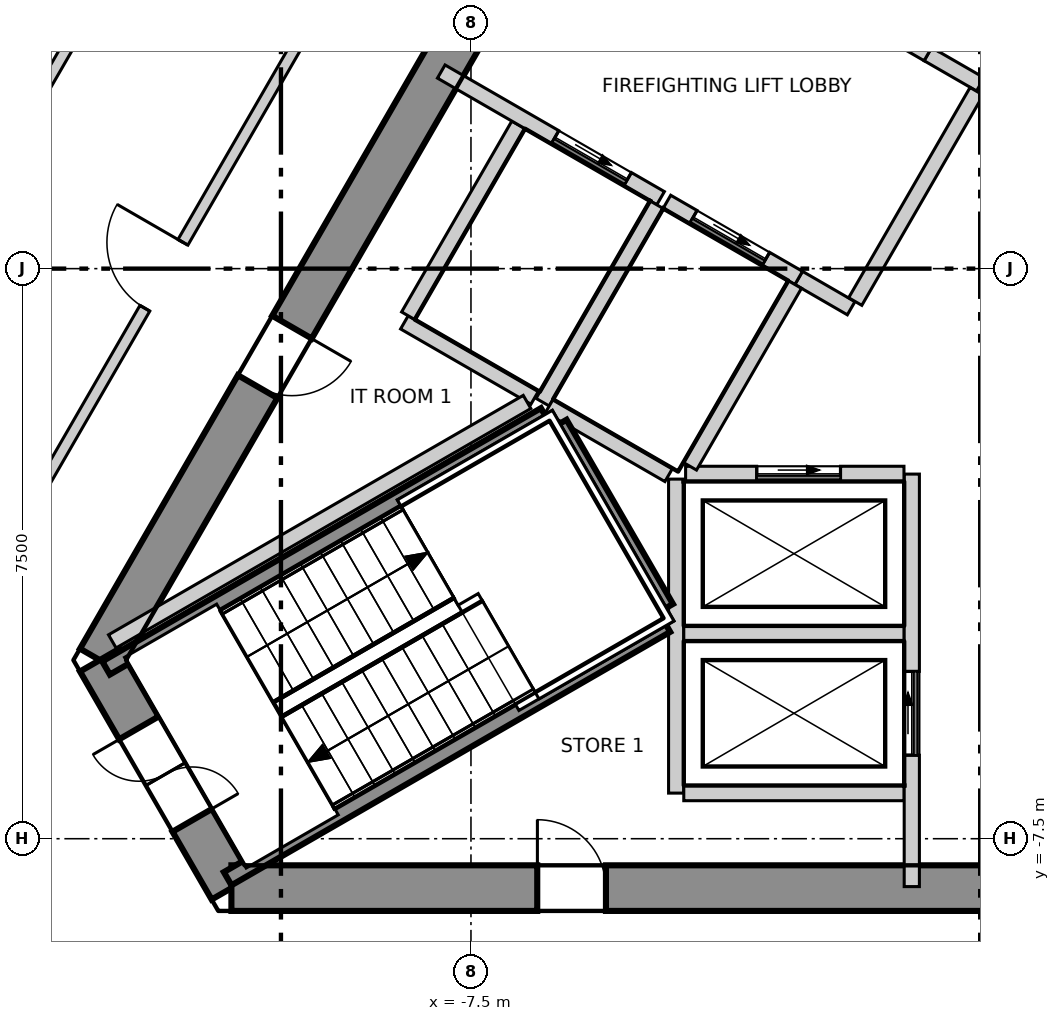
"""IFC4 building model, lengths in metres.
Left out: names, types, materials, properties, quantities, classifications, styles, units other than length and angle.
Written with IfcOpenShell. Run it as: python <this file> out.ifc"""

import sys

from ifc_helpers import new_model, si_unit, direction, frame, frame_2d, origin, place, context, subcontext, project, spatial, polyline, rectangle, outline, extrude, element, fill, save


model = new_model("IFC4")
c1 = context("Model", 3, precision=1e-05, world=origin(), true_north=direction((0.0, 1.0)))
c2 = subcontext(c1, "Body", "Model", "MODEL_VIEW")
j1 = project(units=[si_unit("LENGTHUNIT", "METRE"), si_unit("PLANEANGLEUNIT", "RADIAN")], contexts=[c1])
p1 = place(None, origin())
s1 = spatial("IfcSite", under=j1, at=p1, CompositionType="ELEMENT")
p2 = place(p1, origin())
s2 = spatial("IfcBuilding", under=s1, at=p2, CompositionType="ELEMENT")
p3 = place(p2, frame((0.0, 0.0, 261.8)))
s3 = spatial("IfcBuildingStorey", under=s2, at=p3, CompositionType="ELEMENT", Elevation=261.8)
p4 = place(p3, frame((-1.732, 13.3, -0.3), z_axis=(0.0, 0.0, 1.0), x_axis=(-0.500000539815, -0.866025092122, 0.0)))
e1 = element("IfcWall", 1, at=p4, inside=s3, PredefinedType="SHEAR", context=c2, shape_type="SweptSolid", body=[
    extrude(outline(polyline([(-0.173, -0.3), (1.795, -0.3), (3.763, -0.3), (5.732, -0.3), (7.7, -0.3), (9.668, -0.301), (11.637, -0.301), (13.605, -0.301), (15.573, -0.301), (17.542, -0.301), (19.51, -0.301), (21.478, -0.301), (21.131, 0.3), (19.226, 0.3), (17.321, 0.3), (15.415, 0.3), (13.51, 0.3), (11.605, 0.3), (9.699, 0.3), (7.794, 0.3), (5.889, 0.3), (3.984, 0.3), (2.078, 0.3), (0.173, 0.3), (-0.173, -0.3)])), origin(), (0.0, 0.0, 1.0), 6.5),
])
p5 = place(p4, frame((10.102, 0.0, 0.3)))
e2 = element("IfcOpeningElement", 2, at=p5, cuts=e1, PredefinedType="OPENING", context=c2, shape_type="SweptSolid", body=[
    extrude(rectangle(XDim=1.1, YDim=2.1, at=frame_2d((0.55, 1.05))), frame((0.0, 0.31, 0.0), z_axis=(0.0, -1.0, 0.0), x_axis=(1.0, 0.0, 0.0)), (0.0, 0.0, 1.0), 0.621),
])
p6 = place(p4, frame((16.248, 0.0, 0.3)))
e3 = element("IfcOpeningElement", 3, at=p6, cuts=e1, PredefinedType="OPENING", context=c2, shape_type="SweptSolid", body=[
    extrude(rectangle(XDim=0.9, YDim=2.1, at=frame_2d((0.45, 1.05))), frame((0.0, 0.31, 0.0), z_axis=(0.0, -1.0, 0.0), x_axis=(1.0, 0.0, 0.0)), (0.0, 0.0, 1.0), 0.621),
])
p7 = place(p3, frame((-12.384, -5.15, -0.3), z_axis=(0.0, 0.0, 1.0), x_axis=(0.49997462182, -0.866040055388, 0.0)))
e4 = element("IfcWall", 4, at=p7, inside=s3, PredefinedType="SHEAR", context=c2, shape_type="SweptSolid", body=[
    extrude(outline(polyline([(-0.173, -0.301), (1.732, -0.301), (3.637, -0.3), (3.291, 0.3), (1.732, 0.3), (0.173, 0.3), (-0.173, -0.301)])), origin(), (0.0, 0.0, 1.0), 6.5),
])
p8 = place(p7, frame((1.032, 0.0, 0.3)))
e5 = element("IfcOpeningElement", 5, at=p8, cuts=e4, PredefinedType="OPENING", context=c2, shape_type="SweptSolid", body=[
    extrude(rectangle(XDim=1.4, YDim=2.1, at=frame_2d((0.7, 1.05))), frame((0.0, 0.31, 0.0), z_axis=(0.0, -1.0, 0.0), x_axis=(1.0, 0.0, 0.0)), (0.0, 0.0, 1.0), 0.621),
])
p9 = place(p3, frame((-10.652, -8.15, -0.3), z_axis=(0.0, 0.0, 1.0), x_axis=(1.0, 0.0, 0.0)))
e6 = element("IfcWall", 6, at=p9, inside=s3, PredefinedType="SHEAR", context=c2, shape_type="SweptSolid", body=[
    extrude(outline(polyline([(-0.173, -0.3), (1.795, -0.3), (3.763, -0.3), (5.731, -0.3), (7.7, -0.3), (9.668, -0.3), (11.636, -0.3), (13.604, -0.3), (15.573, -0.3), (17.541, -0.3), (19.509, -0.3), (21.477, -0.3), (21.131, 0.3), (19.226, 0.3), (17.321, 0.3), (15.415, 0.3), (13.51, 0.3), (11.605, 0.3), (9.699, 0.3), (7.794, 0.3), (5.889, 0.3), (3.984, 0.3), (2.078, 0.3), (0.173, 0.3), (-0.173, -0.3)])), origin(), (0.0, 0.0, 1.0), 6.5),
])
p10 = place(p9, frame((4.026, 0.0, 0.3)))
e7 = element("IfcOpeningElement", 7, at=p10, cuts=e6, PredefinedType="OPENING", context=c2, shape_type="SweptSolid", body=[
    extrude(rectangle(XDim=0.9, YDim=2.1, at=frame_2d((0.45, 1.05))), frame((0.0, 0.31, 0.0), z_axis=(0.0, -1.0, 0.0), x_axis=(1.0, 0.0, 0.0)), (0.0, 0.0, 1.0), 0.62),
])
p11 = place(p9, frame((16.378, 0.0, 0.3)))
e8 = element("IfcOpeningElement", 8, at=p11, cuts=e6, PredefinedType="OPENING", context=c2, shape_type="SweptSolid", body=[
    extrude(rectangle(XDim=0.9, YDim=2.1, at=frame_2d((0.45, 1.05))), frame((0.0, 0.31, 0.0), z_axis=(0.0, -1.0, 0.0), x_axis=(1.0, 0.0, 0.0)), (0.0, 0.0, 1.0), 0.62),
])
p12 = place(p3, frame((-14.463, -5.15, 0.0), z_axis=(0.0, 0.0, 1.0), x_axis=(0.500017691629, 0.866015189277, 0.0)))
e9 = element("IfcWall", 9, at=p12, inside=s3, PredefinedType="PARTITIONING", context=c2, shape_type="SweptSolid", body=[
    extrude(rectangle(XDim=23.383, YDim=0.15, at=frame_2d((11.691, 0.0))), origin(), (0.0, 0.0, 1.0), 6.2),
])
p13 = place(p12, frame((17.037, 0.0, 0.0)))
e10 = element("IfcOpeningElement", 10, at=p13, cuts=e9, PredefinedType="OPENING", context=c2, shape_type="SweptSolid", body=[
    extrude(rectangle(XDim=1.0, YDim=2.1, at=frame_2d((0.5, 1.05))), frame((0.0, 0.085, 0.0), z_axis=(0.0, -1.0, 0.0), x_axis=(1.0, 0.0, 0.0)), (0.0, 0.0, 1.0), 0.17),
])
p14 = place(p12, frame((5.346, 0.0, 0.0)))
e11 = element("IfcOpeningElement", 11, at=p14, cuts=e9, PredefinedType="OPENING", context=c2, shape_type="SweptSolid", body=[
    extrude(rectangle(XDim=1.0, YDim=2.1, at=frame_2d((0.5, 1.05))), frame((0.0, 0.085, 0.0), z_axis=(0.0, -1.0, 0.0), x_axis=(1.0, 0.0, 0.0)), (0.0, 0.0, 1.0), 0.17),
])
p15 = place(p3, frame((-19.571, -8.798, 0.0), z_axis=(0.0, 0.0, 1.0), x_axis=(0.500014166641, 0.866017224516, 0.0)))
e12 = element("IfcWall", 12, at=p15, inside=s3, PredefinedType="PARTITIONING", context=c2, shape_type="SweptSolid", body=[
    extrude(rectangle(XDim=34.991, YDim=0.15, at=frame_2d((17.496, 0.0))), origin(), (0.0, 0.0, 1.0), 6.2),
])
p16 = place(p3, frame((-23.25, -10.317, 0.0), z_axis=(0.0, 0.0, 1.0), x_axis=(0.500024875003, 0.866011041719, 0.0)))
e13 = element("IfcWall", 13, at=p16, inside=s3, PredefinedType="PARTITIONING", context=c2, shape_type="SweptSolid", body=[
    extrude(rectangle(XDim=41.206, YDim=0.15, at=frame_2d((20.603, 0.0))), origin(), (0.0, 0.0, 1.0), 6.2),
])
p17 = place(p3, frame((-8.376, -0.707, 0.0), z_axis=(0.0, 0.0, 1.0), x_axis=(0.866072678707, -0.499918108492, 0.0)))
e14 = element("IfcWall", 14, at=p17, inside=s3, PredefinedType="SOLIDWALL", context=c2, shape_type="SweptSolid", body=[
    extrude(rectangle(XDim=1.98, YDim=0.2, at=frame_2d((0.99, 0.0))), origin(), (0.0, 0.0, 1.0), 6.2),
])
p18 = place(p3, frame((-8.326, -0.62, 0.0), z_axis=(0.0, 0.0, 1.0), x_axis=(0.500023687443, 0.866011727401, 0.0)))
e15 = element("IfcWall", 15, at=p18, inside=s3, PredefinedType="SOLIDWALL", context=c2, shape_type="SweptSolid", body=[
    extrude(rectangle(XDim=2.9, YDim=0.2, at=frame_2d((1.45, 0.0))), origin(), (0.0, 0.0, 1.0), 6.2),
])
p19 = place(p3, frame((-4.8, -6.9, 0.0), z_axis=(0.0, 0.0, 1.0), x_axis=(0.0, 1.0, 0.0)))
e16 = element("IfcWall", 16, at=p19, inside=s3, PredefinedType="SOLIDWALL", context=c2, shape_type="SweptSolid", body=[
    extrude(rectangle(XDim=4.131, YDim=0.2, at=frame_2d((2.065, 0.0))), origin(), (0.0, 0.0, 1.0), 6.2),
])
for number, where, z_axis, x_axis in (
    (17, (-4.7, -6.9, 0.0), (0.0, 0.0, 1.0), (1.0, 0.0, 0.0)),
    (18, (-4.7, -4.8, 0.0), (0.0, 0.0, 1.0), (1.0, 0.0, 0.0)),
):
    element("IfcWall", number, at=place(p3, frame(where, z_axis=z_axis, x_axis=x_axis)), inside=s3, PredefinedType="SOLIDWALL", context=c2, shape_type="SweptSolid", body=[
        extrude(rectangle(XDim=2.9, YDim=0.2, at=frame_2d((1.45, 0.0))), origin(), (0.0, 0.0, 1.0), 6.2),
    ])
p20 = place(p3, frame((-1.7, -8.13, 0.0), z_axis=(0.0, 0.0, 1.0), x_axis=(0.0, 1.0, 0.0)))
e19 = element("IfcWall", 19, at=p20, inside=s3, PredefinedType="SOLIDWALL", context=c2, shape_type="SweptSolid", body=[
    extrude(rectangle(XDim=5.427, YDim=0.2, at=frame_2d((2.713, 0.0))), origin(), (0.0, 0.0, 1.0), 6.2),
])
p21 = place(p20, frame((1.73, 0.0, 0.0)))
e20 = element("IfcOpeningElement", 20, at=p21, cuts=e19, PredefinedType="OPENING", context=c2, shape_type="SweptSolid", body=[
    extrude(rectangle(XDim=1.1, YDim=2.1, at=frame_2d((0.55, 1.05))), frame((0.0, 0.11, 0.0), z_axis=(0.0, -1.0, 0.0), x_axis=(1.0, 0.0, 0.0)), (0.0, 0.0, 1.0), 0.22),
])
p22 = place(p3, frame((-4.676, -2.7, 0.0), z_axis=(0.0, 0.0, 1.0), x_axis=(1.0, 0.0, 0.0)))
e21 = element("IfcWall", 21, at=p22, inside=s3, PredefinedType="SOLIDWALL", context=c2, shape_type="SweptSolid", body=[
    extrude(rectangle(XDim=2.873, YDim=0.2, at=frame_2d((1.437, 0.0))), origin(), (0.0, 0.0, 1.0), 6.2),
])
p23 = place(p22, frame((0.937, 0.0, 0.0)))
e22 = element("IfcOpeningElement", 22, at=p23, cuts=e21, PredefinedType="OPENING", context=c2, shape_type="SweptSolid", body=[
    extrude(rectangle(XDim=1.1, YDim=2.1, at=frame_2d((0.55, 1.05))), frame((0.0, 0.11, 0.0), z_axis=(0.0, -1.0, 0.0), x_axis=(1.0, 0.0, 0.0)), (0.0, 0.0, 1.0), 0.22),
])
p24 = place(p3, frame((-7.891, 2.593, 0.0), z_axis=(0.0, 0.0, 1.0), x_axis=(0.866070917804, -0.499921159118, 0.0)))
e23 = element("IfcWall", 23, at=p24, inside=s3, PredefinedType="SOLIDWALL", context=c2, shape_type="SweptSolid", body=[
    extrude(rectangle(XDim=3.333, YDim=0.2, at=frame_2d((1.666, 0.0))), origin(), (0.0, 0.0, 1.0), 6.2),
])
p25 = place(p24, frame((1.73, 0.0, 0.0)))
e24 = element("IfcOpeningElement", 24, at=p25, cuts=e23, PredefinedType="OPENING", context=c2, shape_type="SweptSolid", body=[
    extrude(rectangle(XDim=1.1, YDim=2.1, at=frame_2d((0.55, 1.05))), frame((0.0, 0.11, 0.0), z_axis=(0.0, -1.0, 0.0), x_axis=(1.0, 0.0, 0.0)), (0.0, 0.0, 1.0), 0.22),
])
p26 = place(p3, frame((-3.188, -0.122, 0.0), z_axis=(0.0, 0.0, 1.0), x_axis=(0.865705793592, -0.50055317294, 0.0)))
e25 = element("IfcWall", 25, at=p26, inside=s3, PredefinedType="SOLIDWALL", context=c2, shape_type="SweptSolid", body=[
    extrude(rectangle(XDim=0.797, YDim=0.2, at=frame_2d((0.398, 0.0))), origin(), (0.0, 0.0, 1.0), 6.2),
])
p27 = place(p3, frame((-1.488, 2.822, 0.0), z_axis=(0.0, 0.0, 1.0), x_axis=(0.866236612152, -0.499633997809, 0.0)))
e26 = element("IfcWall", 26, at=p27, inside=s3, PredefinedType="SOLIDWALL", context=c2, shape_type="SweptSolid", body=[
    extrude(rectangle(XDim=0.796, YDim=0.2, at=frame_2d((0.398, 0.0))), origin(), (0.0, 0.0, 1.0), 6.2),
])
p28 = place(p3, frame((-2.444, -0.433, 0.0), z_axis=(0.0, 0.0, 1.0), x_axis=(0.500035624827, 0.866004834804, 0.0)))
e27 = element("IfcWall", 27, at=p28, inside=s3, PredefinedType="SOLIDWALL", context=c2, shape_type="SweptSolid", body=[
    extrude(rectangle(XDim=3.194, YDim=0.2, at=frame_2d((1.597, 0.0))), origin(), (0.0, 0.0, 1.0), 6.2),
])
p29 = place(p3, frame((-6.557, -1.757, 0.0), z_axis=(0.0, 0.0, 1.0), x_axis=(0.499990139034, 0.866031096941, 0.0)))
e28 = element("IfcWall", 28, at=p29, inside=s3, PredefinedType="SOLIDWALL", context=c2, shape_type="SweptSolid", body=[
    extrude(rectangle(XDim=3.0, YDim=0.2, at=frame_2d((1.5, 0.0))), origin(), (0.0, 0.0, 1.0), 6.2),
])
p30 = place(p3, frame((-6.47, -1.807, 0.0), z_axis=(0.0, 0.0, 1.0), x_axis=(0.865883195159, -0.500246231712, 0.0)))
e29 = element("IfcWall", 29, at=p30, inside=s3, PredefinedType="SOLIDWALL", context=c2, shape_type="SweptSolid", body=[
    extrude(rectangle(XDim=1.815, YDim=0.2, at=frame_2d((0.908, 0.0))), origin(), (0.0, 0.0, 1.0), 6.2),
])
p31 = place(p3, frame((-4.922, 0.879, 0.0), z_axis=(0.0, 0.0, 1.0), x_axis=(0.866073918653, -0.499915960366, 0.0)))
e30 = element("IfcWall", 30, at=p31, inside=s3, PredefinedType="SOLIDWALL", context=c2, shape_type="SweptSolid", body=[
    extrude(rectangle(XDim=2.002, YDim=0.2, at=frame_2d((1.001, 0.0))), origin(), (0.0, 0.0, 1.0), 6.2),
])
p32 = place(p31, frame((0.402, 0.0, 0.0)))
e31 = element("IfcOpeningElement", 31, at=p32, cuts=e30, PredefinedType="OPENING", context=c2, shape_type="SweptSolid", body=[
    extrude(rectangle(XDim=1.1, YDim=2.1, at=frame_2d((0.55, 1.05))), frame((0.0, 0.11, 0.0), z_axis=(0.0, -1.0, 0.0), x_axis=(1.0, 0.0, 0.0)), (0.0, 0.0, 1.0), 0.22),
])
p33 = place(p3, frame((-4.619, -2.6, 0.0), z_axis=(0.0, 0.0, 1.0), x_axis=(0.50009492287, 0.865970593103, 0.0)))
e32 = element("IfcWall", 32, at=p33, inside=s3, PredefinedType="SOLIDWALL", context=c2, shape_type="SweptSolid", body=[
    extrude(rectangle(XDim=2.761, YDim=0.2, at=frame_2d((1.381, 0.0))), origin(), (0.0, 0.0, 1.0), 6.2),
])
p34 = place(p3, frame((-3.309, 3.873, 0.0), z_axis=(0.0, 0.0, 1.0), x_axis=(0.866098583652, -0.499873227325, 0.0)))
e33 = element("IfcWall", 33, at=p34, inside=s3, PredefinedType="SOLIDWALL", context=c2, shape_type="SweptSolid", body=[
    extrude(rectangle(XDim=2.103, YDim=0.2, at=frame_2d((1.051, 0.0))), origin(), (0.0, 0.0, 1.0), 6.2),
])
p35 = place(p34, frame((0.502, 0.0, 0.0)))
e34 = element("IfcOpeningElement", 34, at=p35, cuts=e33, PredefinedType="OPENING", context=c2, shape_type="SweptSolid", body=[
    extrude(rectangle(XDim=1.1, YDim=2.1, at=frame_2d((0.55, 1.05))), frame((0.0, 0.11, 0.0), z_axis=(0.0, -1.0, 0.0), x_axis=(1.0, 0.0, 0.0)), (0.0, 0.0, 1.0), 0.22),
])
p36 = place(p3, frame((-12.219, -4.904, 0.0), z_axis=(0.0, 0.0, 1.0), x_axis=(0.8660578368, 0.499943820161, 0.0)))
e35 = element("IfcWall", 35, at=p36, inside=s3, PredefinedType="SOLIDWALL", context=c2, shape_type="SweptSolid", body=[
    extrude(rectangle(XDim=6.301, YDim=0.2, at=frame_2d((3.15, 0.0))), origin(), (0.0, 0.0, 1.0), 6.2),
])
p37 = place(p3, frame((-12.301, -5.254, 0.0), z_axis=(0.0, 0.0, 1.0), x_axis=(0.866068467981, 0.499925403204, 0.0)))
e36 = element("IfcWall", 36, at=p37, inside=s3, PredefinedType="SOLIDWALL", context=c2, shape_type="SweptSolid", body=[
    extrude(rectangle(XDim=6.665, YDim=0.2, at=frame_2d((3.332, 0.0))), origin(), (0.0, 0.0, 1.0), 6.2),
])
p38 = place(p3, frame((-6.329, -2.038, 0.0), z_axis=(0.0, 0.0, 1.0), x_axis=(0.500200581029, -0.865909567298, 0.0)))
e37 = element("IfcWall", 37, at=p38, inside=s3, PredefinedType="SOLIDWALL", context=c2, shape_type="SweptSolid", body=[
    extrude(rectangle(XDim=2.799, YDim=0.2, at=frame_2d((1.399, 0.0))), origin(), (0.0, 0.0, 1.0), 6.2),
])
p39 = place(p3, frame((-10.701, -8.026, 0.0), z_axis=(0.0, 0.0, 1.0), x_axis=(0.866005022404, 0.500035299925, 0.0)))
e38 = element("IfcWall", 38, at=p39, inside=s3, PredefinedType="SOLIDWALL", context=c2, shape_type="SweptSolid", body=[
    extrude(rectangle(XDim=6.665, YDim=0.2, at=frame_2d((3.333, 0.0))), origin(), (0.0, 0.0, 1.0), 6.2),
])
p40 = place(p23, origin())
e39 = element("IfcDoor", 39, at=p40, inside=s3, OperationType="SLIDING_TO_LEFT", PredefinedType="DOOR", context=c2, shape_type="SweptSolid", body=[
    extrude(rectangle(XDim=1.1, YDim=2.1, at=frame_2d((0.55, 1.05))), frame((0.0, 0.025, 0.0), z_axis=(0.0, -1.0, 0.0), x_axis=(1.0, 0.0, 0.0)), (0.0, 0.0, 1.0), 0.05),
])
fill(e22, e39)
p41 = place(p21, origin())
e40 = element("IfcDoor", 40, at=p41, inside=s3, OperationType="SLIDING_TO_LEFT", PredefinedType="DOOR", context=c2, shape_type="SweptSolid", body=[
    extrude(rectangle(XDim=1.1, YDim=2.1, at=frame_2d((0.55, 1.05))), frame((0.0, 0.025, 0.0), z_axis=(0.0, -1.0, 0.0), x_axis=(1.0, 0.0, 0.0)), (0.0, 0.0, 1.0), 0.05),
])
fill(e20, e40)
p42 = place(p32, origin())
e41 = element("IfcDoor", 41, at=p42, inside=s3, OperationType="SLIDING_TO_LEFT", PredefinedType="DOOR", context=c2, shape_type="SweptSolid", body=[
    extrude(rectangle(XDim=1.1, YDim=2.1, at=frame_2d((0.55, 1.05))), frame((0.0, 0.025, 0.0), z_axis=(0.0, -1.0, 0.0), x_axis=(1.0, 0.0, 0.0)), (0.0, 0.0, 1.0), 0.05),
])
fill(e31, e41)
p43 = place(p25, origin())
e42 = element("IfcDoor", 42, at=p43, inside=s3, OperationType="SLIDING_TO_LEFT", PredefinedType="DOOR", context=c2, shape_type="SweptSolid", body=[
    extrude(rectangle(XDim=1.1, YDim=2.1, at=frame_2d((0.55, 1.05))), frame((0.0, 0.025, 0.0), z_axis=(0.0, -1.0, 0.0), x_axis=(1.0, 0.0, 0.0)), (0.0, 0.0, 1.0), 0.05),
])
fill(e24, e42)
p44 = place(p14, origin())
e43 = element("IfcDoor", 43, at=p44, inside=s3, OperationType="SINGLE_SWING_LEFT", PredefinedType="DOOR", context=c2, shape_type="SweptSolid", body=[
    extrude(rectangle(XDim=1.0, YDim=2.1, at=frame_2d((0.5, 1.05))), frame((0.0, 0.025, 0.0), z_axis=(0.0, -1.0, 0.0), x_axis=(1.0, 0.0, 0.0)), (0.0, 0.0, 1.0), 0.05),
])
fill(e11, e43)
p45 = place(p8, origin())
e44 = element("IfcDoor", 44, at=p45, inside=s3, OperationType="DOUBLE_DOOR_SINGLE_SWING", PredefinedType="DOOR", context=c2, shape_type="SweptSolid", body=[
    extrude(rectangle(XDim=1.4, YDim=2.1, at=frame_2d((0.7, 1.05))), frame((0.0, 0.025, 0.0), z_axis=(0.0, -1.0, 0.0), x_axis=(1.0, 0.0, 0.0)), (0.0, 0.0, 1.0), 0.05),
])
fill(e5, e44)
p46 = place(p6, origin())
e45 = element("IfcDoor", 45, at=p46, inside=s3, OperationType="SINGLE_SWING_RIGHT", PredefinedType="DOOR", context=c2, shape_type="SweptSolid", body=[
    extrude(rectangle(XDim=0.9, YDim=2.1, at=frame_2d((0.45, 1.05))), frame((0.0, 0.025, 0.0), z_axis=(0.0, -1.0, 0.0), x_axis=(1.0, 0.0, 0.0)), (0.0, 0.0, 1.0), 0.05),
])
fill(e3, e45)
p47 = place(p10, origin())
e46 = element("IfcDoor", 46, at=p47, inside=s3, OperationType="SINGLE_SWING_RIGHT", PredefinedType="DOOR", context=c2, shape_type="SweptSolid", body=[
    extrude(rectangle(XDim=0.9, YDim=2.1, at=frame_2d((0.45, 1.05))), frame((0.0, 0.025, 0.0), z_axis=(0.0, -1.0, 0.0), x_axis=(1.0, 0.0, 0.0)), (0.0, 0.0, 1.0), 0.05),
])
fill(e7, e46)
save(model, sys.argv[1])
